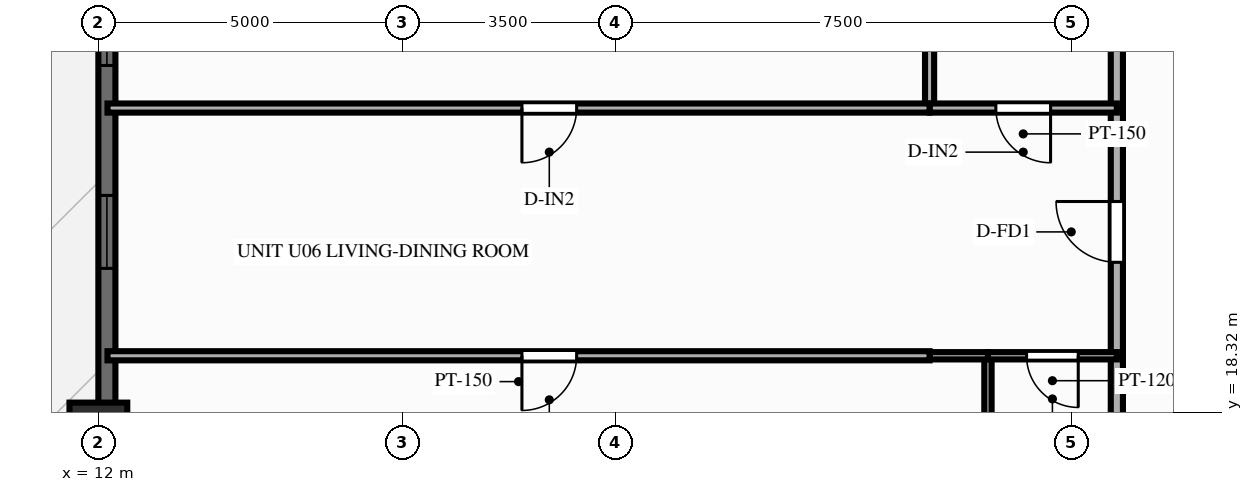
"""IFC4 building model, lengths in metres.
Left out: names, types, materials, properties, quantities, classifications, styles, units other than length and angle.
Written with IfcOpenShell. Run it as: python <this file> out.ifc"""

import sys

from ifc_helpers import new_model, si_unit, direction, frame, frame_2d, origin, origin_2d, place, context, subcontext, project, spatial, rectangle, extrude, source, transform, mapped, element, fill, save


model = new_model("IFC4")
c1 = context("Model", 3, precision=1e-05, world=origin(), true_north=direction((0.0, 1.0)))
c2 = subcontext(c1, "Body", "Model", "MODEL_VIEW")
j1 = project(units=[si_unit("LENGTHUNIT", "METRE"), si_unit("PLANEANGLEUNIT", "RADIAN")], contexts=[c1])
p1 = place(None, origin())
s1 = spatial("IfcSite", under=j1, at=p1, CompositionType="ELEMENT")
p2 = place(p1, origin())
s2 = spatial("IfcBuilding", under=s1, at=p2, CompositionType="ELEMENT")
p3 = place(p2, frame((0.0, 0.0, 116.85)))
s3 = spatial("IfcBuildingStorey", under=s2, at=p3, CompositionType="ELEMENT", Elevation=116.85)
m1 = source(origin(), c2, "Body", "SweptSolid", [
    extrude(rectangle(XDim=0.95, YDim=0.95, at=origin_2d()), origin(), (0.0, 0.0, 1.0), 3.0),
])
p4 = place(p3, frame((12.0, 18.0, 0.0), z_axis=(0.0, 0.0, 1.0), x_axis=(1.0, 0.0, 0.0)))
e1 = element("IfcColumn", 1, at=p4, inside=s3, PredefinedType="COLUMN", context=c2, shape_type="MappedRepresentation", body=[
    mapped(m1, transform((0.0, 0.0, 0.0), scale=1.0)),
])
p5 = place(p3, frame((12.14, 7.2, 0.0), z_axis=(0.0, 0.0, 1.0), x_axis=(0.0, 1.0, 0.0)))
e2 = element("IfcWall", 2, at=p5, inside=s3, PredefinedType="SOLIDWALL", context=c2, shape_type="SweptSolid", body=[
    extrude(rectangle(XDim=39.6, YDim=0.28, at=frame_2d((19.8, 0.0))), origin(), (0.0, 0.0, 1.0), 2.28),
])
p6 = place(p5, frame((0.945, 0.0, 0.25)))
e3 = element("IfcOpeningElement", 3, at=p6, cuts=e2, PredefinedType="OPENING", context=c2, shape_type="SweptSolid", body=[
    extrude(rectangle(XDim=1.2, YDim=1.5, at=frame_2d((0.6, 0.75))), frame((0.0, 0.152, 0.0), z_axis=(0.0, -1.0, 0.0), x_axis=(1.0, 0.0, 0.0)), (0.0, 0.0, 1.0), 0.304),
])
p7 = place(p5, frame((4.213, 0.0, 0.25)))
e4 = element("IfcOpeningElement", 4, at=p7, cuts=e2, PredefinedType="OPENING", context=c2, shape_type="SweptSolid", body=[
    extrude(rectangle(XDim=1.2, YDim=1.5, at=frame_2d((0.6, 0.75))), frame((0.0, 0.152, 0.0), z_axis=(0.0, -1.0, 0.0), x_axis=(1.0, 0.0, 0.0)), (0.0, 0.0, 1.0), 0.304),
])
p8 = place(p5, frame((7.55, 0.0, 0.25)))
e5 = element("IfcOpeningElement", 5, at=p8, cuts=e2, PredefinedType="OPENING", context=c2, shape_type="SweptSolid", body=[
    extrude(rectangle(XDim=1.2, YDim=1.5, at=frame_2d((0.6, 0.75))), frame((0.0, 0.152, 0.0), z_axis=(0.0, -1.0, 0.0), x_axis=(1.0, 0.0, 0.0)), (0.0, 0.0, 1.0), 0.304),
])
p9 = place(p5, frame((13.483, 0.0, 0.25)))
e6 = element("IfcOpeningElement", 6, at=p9, cuts=e2, PredefinedType="OPENING", context=c2, shape_type="SweptSolid", body=[
    extrude(rectangle(XDim=1.2, YDim=1.5, at=frame_2d((0.6, 0.75))), frame((0.0, 0.152, 0.0), z_axis=(0.0, -1.0, 0.0), x_axis=(1.0, 0.0, 0.0)), (0.0, 0.0, 1.0), 0.304),
])
p10 = place(p5, frame((16.82, 0.0, 0.25)))
e7 = element("IfcOpeningElement", 7, at=p10, cuts=e2, PredefinedType="OPENING", context=c2, shape_type="SweptSolid", body=[
    extrude(rectangle(XDim=1.2, YDim=1.5, at=frame_2d((0.6, 0.75))), frame((0.0, 0.152, 0.0), z_axis=(0.0, -1.0, 0.0), x_axis=(1.0, 0.0, 0.0)), (0.0, 0.0, 1.0), 0.304),
])
p11 = place(p5, frame((19.2, 0.0, 0.25)))
e8 = element("IfcOpeningElement", 8, at=p11, cuts=e2, PredefinedType="OPENING", context=c2, shape_type="SweptSolid", body=[
    extrude(rectangle(XDim=1.2, YDim=1.5, at=frame_2d((0.6, 0.75))), frame((0.0, 0.152, 0.0), z_axis=(0.0, -1.0, 0.0), x_axis=(1.0, 0.0, 0.0)), (0.0, 0.0, 1.0), 0.304),
])
p12 = place(p5, frame((21.992, 0.0, 0.0)))
e9 = element("IfcOpeningElement", 9, at=p12, cuts=e2, PredefinedType="OPENING", context=c2, shape_type="SweptSolid", body=[
    extrude(rectangle(XDim=1.6, YDim=2.15, at=frame_2d((0.8, 1.075))), frame((0.0, 0.152, 0.0), z_axis=(0.0, -1.0, 0.0), x_axis=(1.0, 0.0, 0.0)), (0.0, 0.0, 1.0), 0.304),
])
p13 = place(p5, frame((25.529, 0.0, 0.25)))
e10 = element("IfcOpeningElement", 10, at=p13, cuts=e2, PredefinedType="OPENING", context=c2, shape_type="SweptSolid", body=[
    extrude(rectangle(XDim=1.2, YDim=1.5, at=frame_2d((0.6, 0.75))), frame((0.0, 0.152, 0.0), z_axis=(0.0, -1.0, 0.0), x_axis=(1.0, 0.0, 0.0)), (0.0, 0.0, 1.0), 0.304),
])
p14 = place(p5, frame((29.349, 0.0, 0.25)))
e11 = element("IfcOpeningElement", 11, at=p14, cuts=e2, PredefinedType="OPENING", context=c2, shape_type="SweptSolid", body=[
    extrude(rectangle(XDim=0.7, YDim=1.5, at=frame_2d((0.35, 0.75))), frame((0.0, 0.152, 0.0), z_axis=(0.0, -1.0, 0.0), x_axis=(1.0, 0.0, 0.0)), (0.0, 0.0, 1.0), 0.304),
])
p15 = place(p5, frame((31.285, 0.0, 0.25)))
e12 = element("IfcOpeningElement", 12, at=p15, cuts=e2, PredefinedType="OPENING", context=c2, shape_type="SweptSolid", body=[
    extrude(rectangle(XDim=1.2, YDim=1.5, at=frame_2d((0.6, 0.75))), frame((0.0, 0.152, 0.0), z_axis=(0.0, -1.0, 0.0), x_axis=(1.0, 0.0, 0.0)), (0.0, 0.0, 1.0), 0.304),
])
p16 = place(p5, frame((34.252, 0.0, 0.25)))
e13 = element("IfcOpeningElement", 13, at=p16, cuts=e2, PredefinedType="OPENING", context=c2, shape_type="SweptSolid", body=[
    extrude(rectangle(XDim=1.2, YDim=1.5, at=frame_2d((0.6, 0.75))), frame((0.0, 0.152, 0.0), z_axis=(0.0, -1.0, 0.0), x_axis=(1.0, 0.0, 0.0)), (0.0, 0.0, 1.0), 0.304),
])
p17 = place(p5, frame((37.151, 0.0, 0.25)))
e14 = element("IfcOpeningElement", 14, at=p17, cuts=e2, PredefinedType="OPENING", context=c2, shape_type="SweptSolid", body=[
    extrude(rectangle(XDim=1.2, YDim=1.5, at=frame_2d((0.6, 0.75))), frame((0.0, 0.152, 0.0), z_axis=(0.0, -1.0, 0.0), x_axis=(1.0, 0.0, 0.0)), (0.0, 0.0, 1.0), 0.304),
])
p18 = place(p3, frame((28.75, 16.65, 0.0), z_axis=(0.0, 0.0, 1.0), x_axis=(0.0, 1.0, 0.0)))
e15 = element("IfcWall", 15, at=p18, inside=s3, PredefinedType="PARTITIONING", context=c2, shape_type="SweptSolid", body=[
    extrude(rectangle(XDim=2.596, YDim=0.2, at=frame_2d((1.298, 0.0))), origin(), (0.0, 0.0, 1.0), 2.79),
])
p19 = place(p3, frame((28.75, 19.246, 0.0), z_axis=(0.0, 0.0, 1.0), x_axis=(0.0, 1.0, 0.0)))
e16 = element("IfcWall", 16, at=p19, inside=s3, PredefinedType="PARTITIONING", context=c2, shape_type="SweptSolid", body=[
    extrude(rectangle(XDim=4.074, YDim=0.2, at=frame_2d((2.037, 0.0))), origin(), (0.0, 0.0, 1.0), 2.79),
])
p20 = place(p19, frame((1.537, 0.0, 0.0)))
e17 = element("IfcOpeningElement", 17, at=p20, cuts=e16, PredefinedType="OPENING", context=c2, shape_type="SweptSolid", body=[
    extrude(rectangle(XDim=1.0, YDim=2.15, at=frame_2d((0.5, 1.075))), frame((0.0, 0.112, 0.0), z_axis=(0.0, -1.0, 0.0), x_axis=(1.0, 0.0, 0.0)), (0.0, 0.0, 1.0), 0.224),
])
p21 = place(p3, frame((28.75, 23.32, 0.0), z_axis=(0.0, 0.0, 1.0), x_axis=(0.0, 1.0, 0.0)))
e18 = element("IfcWall", 18, at=p21, inside=s3, PredefinedType="PARTITIONING", context=c2, shape_type="SweptSolid", body=[
    extrude(rectangle(XDim=2.6, YDim=0.2, at=frame_2d((1.3, 0.0))), origin(), (0.0, 0.0, 1.0), 2.79),
])
p22 = place(p3, frame((26.63, 16.65, 0.0), z_axis=(0.0, 0.0, 1.0), x_axis=(0.0, 1.0, 0.0)))
e19 = element("IfcWall", 19, at=p22, inside=s3, PredefinedType="PARTITIONING", context=c2, shape_type="SweptSolid", body=[
    extrude(rectangle(XDim=2.596, YDim=0.12, at=frame_2d((1.298, 0.0))), origin(), (0.0, 0.0, 1.0), 2.79),
])
p23 = place(p3, frame((25.67, 23.32, 0.0), z_axis=(0.0, 0.0, 1.0), x_axis=(0.0, 1.0, 0.0)))
e20 = element("IfcWall", 20, at=p23, inside=s3, PredefinedType="PARTITIONING", context=c2, shape_type="SweptSolid", body=[
    extrude(rectangle(XDim=2.6, YDim=0.15, at=frame_2d((1.3, 0.0))), origin(), (0.0, 0.0, 1.0), 2.79),
])
p24 = place(p3, frame((28.75, 19.246, 0.0), z_axis=(0.0, 0.0, 1.0), x_axis=(-1.0, 0.0, 0.0)))
e21 = element("IfcWall", 21, at=p24, inside=s3, PredefinedType="PARTITIONING", context=c2, shape_type="SweptSolid", body=[
    extrude(rectangle(XDim=2.12, YDim=0.12, at=frame_2d((1.06, 0.0))), origin(), (0.0, 0.0, 1.0), 2.79),
])
p25 = place(p24, frame((0.635, 0.0, 0.0)))
e22 = element("IfcOpeningElement", 22, at=p25, cuts=e21, PredefinedType="OPENING", context=c2, shape_type="SweptSolid", body=[
    extrude(rectangle(XDim=0.85, YDim=2.05, at=frame_2d((0.425, 1.025))), frame((0.0, 0.072, 0.0), z_axis=(0.0, -1.0, 0.0), x_axis=(1.0, 0.0, 0.0)), (0.0, 0.0, 1.0), 0.144),
])
p26 = place(p3, frame((26.63, 19.246, 0.0), z_axis=(0.0, 0.0, 1.0), x_axis=(-1.0, 0.0, 0.0)))
e23 = element("IfcWall", 23, at=p26, inside=s3, PredefinedType="PARTITIONING", context=c2, shape_type="SweptSolid", body=[
    extrude(rectangle(XDim=0.96, YDim=0.12, at=frame_2d((0.48, 0.0))), origin(), (0.0, 0.0, 1.0), 2.79),
])
p27 = place(p3, frame((25.67, 19.246, 0.0), z_axis=(0.0, 0.0, 1.0), x_axis=(-1.0, 0.0, 0.0)))
e24 = element("IfcWall", 24, at=p27, inside=s3, PredefinedType="PARTITIONING", context=c2, shape_type="SweptSolid", body=[
    extrude(rectangle(XDim=13.52, YDim=0.15, at=frame_2d((6.76, 0.0))), origin(), (0.0, 0.0, 1.0), 2.79),
])
p28 = place(p27, frame((5.804, 0.0, 0.0)))
e25 = element("IfcOpeningElement", 25, at=p28, cuts=e24, PredefinedType="OPENING", context=c2, shape_type="SweptSolid", body=[
    extrude(rectangle(XDim=0.9, YDim=2.1, at=frame_2d((0.45, 1.05))), frame((0.0, 0.087, 0.0), z_axis=(0.0, -1.0, 0.0), x_axis=(1.0, 0.0, 0.0)), (0.0, 0.0, 1.0), 0.174),
])
p29 = place(p3, frame((28.75, 23.32, 0.0), z_axis=(0.0, 0.0, 1.0), x_axis=(-1.0, 0.0, 0.0)))
e26 = element("IfcWall", 26, at=p29, inside=s3, PredefinedType="PARTITIONING", context=c2, shape_type="SweptSolid", body=[
    extrude(rectangle(XDim=3.08, YDim=0.15, at=frame_2d((1.54, 0.0))), origin(), (0.0, 0.0, 1.0), 2.79),
])
p30 = place(p29, frame((1.09, 0.0, 0.0)))
e27 = element("IfcOpeningElement", 27, at=p30, cuts=e26, PredefinedType="OPENING", context=c2, shape_type="SweptSolid", body=[
    extrude(rectangle(XDim=0.9, YDim=2.1, at=frame_2d((0.45, 1.05))), frame((0.0, 0.087, 0.0), z_axis=(0.0, -1.0, 0.0), x_axis=(1.0, 0.0, 0.0)), (0.0, 0.0, 1.0), 0.174),
])
p31 = place(p3, frame((25.67, 23.32, 0.0), z_axis=(0.0, 0.0, 1.0), x_axis=(-1.0, 0.0, 0.0)))
e28 = element("IfcWall", 28, at=p31, inside=s3, PredefinedType="PARTITIONING", context=c2, shape_type="SweptSolid", body=[
    extrude(rectangle(XDim=13.52, YDim=0.15, at=frame_2d((6.76, 0.0))), origin(), (0.0, 0.0, 1.0), 2.79),
])
p32 = place(p31, frame((5.804, 0.0, 0.0)))
e29 = element("IfcOpeningElement", 29, at=p32, cuts=e28, PredefinedType="OPENING", context=c2, shape_type="SweptSolid", body=[
    extrude(rectangle(XDim=0.9, YDim=2.1, at=frame_2d((0.45, 1.05))), frame((0.0, 0.087, 0.0), z_axis=(0.0, -1.0, 0.0), x_axis=(1.0, 0.0, 0.0)), (0.0, 0.0, 1.0), 0.174),
])
m2 = source(origin(), c2, "Body", "SweptSolid", [
    extrude(rectangle(XDim=1.2, YDim=1.5, at=frame_2d((0.6, 0.75))), frame((0.0, 0.03, 0.0), z_axis=(0.0, -1.0, 0.0), x_axis=(1.0, 0.0, 0.0)), (0.0, 0.0, 1.0), 0.06),
])
p33 = place(p9, origin())
e30 = element("IfcWindow", 30, at=p33, inside=s3, PartitioningType="SINGLE_PANEL", PredefinedType="WINDOW", context=c2, shape_type="MappedRepresentation", body=[
    mapped(m2, transform((0.0, 0.0, 0.0), scale=1.0)),
])
fill(e6, e30)
p34 = place(p10, origin())
e31 = element("IfcWindow", 31, at=p34, inside=s3, PartitioningType="SINGLE_PANEL", PredefinedType="WINDOW", context=c2, shape_type="MappedRepresentation", body=[
    mapped(m2, transform((0.0, 0.0, 0.0), scale=1.0)),
])
fill(e7, e31)
m3 = source(origin(), c2, "Body", "SweptSolid", [
    extrude(rectangle(XDim=1.0, YDim=2.15, at=frame_2d((0.5, 1.075))), frame((0.0, 0.025, 0.0), z_axis=(0.0, -1.0, 0.0), x_axis=(1.0, 0.0, 0.0)), (0.0, 0.0, 1.0), 0.05),
])
p35 = place(p20, origin())
e32 = element("IfcDoor", 32, at=p35, inside=s3, OperationType="SINGLE_SWING_RIGHT", PredefinedType="DOOR", context=c2, shape_type="MappedRepresentation", body=[
    mapped(m3, transform((0.0, 0.0, 0.0), scale=1.0)),
])
fill(e17, e32)
m4 = source(origin(), c2, "Body", "SweptSolid", [
    extrude(rectangle(XDim=0.85, YDim=2.05, at=frame_2d((0.425, 1.025))), frame((0.0, 0.025, 0.0), z_axis=(0.0, -1.0, 0.0), x_axis=(1.0, 0.0, 0.0)), (0.0, 0.0, 1.0), 0.05),
])
p36 = place(p25, origin())
e33 = element("IfcDoor", 33, at=p36, inside=s3, OperationType="SINGLE_SWING_LEFT", PredefinedType="DOOR", context=c2, shape_type="MappedRepresentation", body=[
    mapped(m4, transform((0.0, 0.0, 0.0), scale=1.0)),
])
fill(e22, e33)
m5 = source(origin(), c2, "Body", "SweptSolid", [
    extrude(rectangle(XDim=0.9, YDim=2.1, at=frame_2d((0.45, 1.05))), frame((0.0, 0.025, 0.0), z_axis=(0.0, -1.0, 0.0), x_axis=(1.0, 0.0, 0.0)), (0.0, 0.0, 1.0), 0.05),
])
p37 = place(p28, origin())
e34 = element("IfcDoor", 34, at=p37, inside=s3, OperationType="SINGLE_SWING_RIGHT", PredefinedType="DOOR", context=c2, shape_type="MappedRepresentation", body=[
    mapped(m5, transform((0.0, 0.0, 0.0), scale=1.0)),
])
fill(e25, e34)
p38 = place(p30, origin())
e35 = element("IfcDoor", 35, at=p38, inside=s3, OperationType="SINGLE_SWING_LEFT", PredefinedType="DOOR", context=c2, shape_type="MappedRepresentation", body=[
    mapped(m5, transform((0.0, 0.0, 0.0), scale=1.0)),
])
fill(e27, e35)
p39 = place(p32, origin())
e36 = element("IfcDoor", 36, at=p39, inside=s3, OperationType="SINGLE_SWING_RIGHT", PredefinedType="DOOR", context=c2, shape_type="MappedRepresentation", body=[
    mapped(m5, transform((0.0, 0.0, 0.0), scale=1.0)),
])
fill(e29, e36)
save(model, sys.argv[1])
